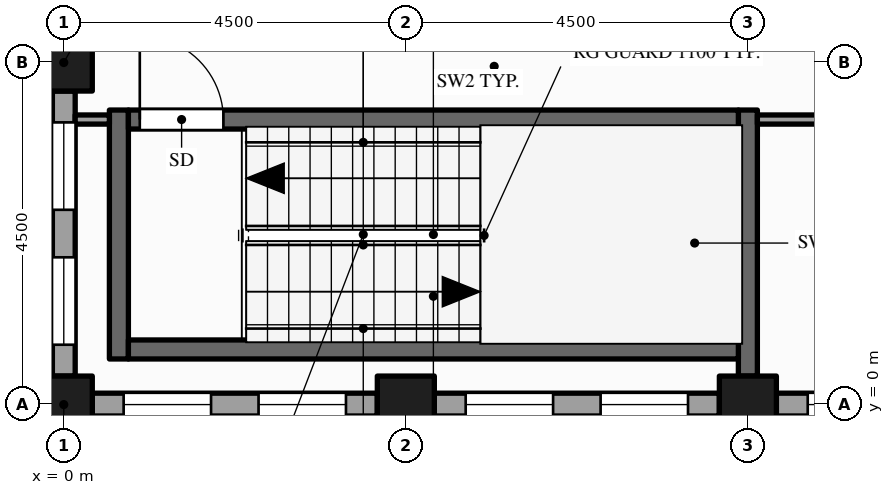
"""IFC4 building model, lengths in metres.
Left out: names, types, materials, properties, quantities, classifications, styles, units other than length and angle.
Written with IfcOpenShell. Run it as: python <this file> out.ifc"""

import sys

from ifc_helpers import new_model, si_unit, direction, frame, frame_2d, origin, origin_2d, place, context, subcontext, project, spatial, rectangle, hollow_rectangle, extrude, element, fill, save


model = new_model("IFC4")
c1 = context("Model", 3, precision=1e-05, world=origin(), true_north=direction((0.0, 1.0)))
c2 = subcontext(c1, "Body", "Model", "MODEL_VIEW")
j1 = project(units=[si_unit("LENGTHUNIT", "METRE"), si_unit("PLANEANGLEUNIT", "RADIAN")], contexts=[c1])
p1 = place(None, origin())
s1 = spatial("IfcSite", under=j1, at=p1, CompositionType="ELEMENT")
p2 = place(p1, origin())
s2 = spatial("IfcBuilding", under=s1, at=p2, CompositionType="ELEMENT")
p3 = place(p2, frame((0.0, 0.0, 227.0)))
s3 = spatial("IfcBuildingStorey", under=s2, at=p3, CompositionType="ELEMENT", Elevation=227.0)
for number, where, z_axis, x_axis in (
    (1, (0.0, 0.0, -0.15), (0.0, 0.0, 1.0), (1.0, 0.0, 0.0)),
    (2, (0.0, 4.5, -0.15), (0.0, 0.0, 1.0), (1.0, 0.0, 0.0)),
    (3, (4.5, 0.0, -0.15), (0.0, 0.0, 1.0), (1.0, 0.0, 0.0)),
    (4, (9.0, 0.0, -0.15), (0.0, 0.0, 1.0), (1.0, 0.0, 0.0)),
):
    element("IfcColumn", number, at=place(p3, frame(where, z_axis=z_axis, x_axis=x_axis)), inside=s3, PredefinedType="COLUMN", context=c2, shape_type="SweptSolid", body=[
        extrude(hollow_rectangle(XDim=0.75, YDim=0.75, WallThickness=0.036, at=origin_2d()), origin(), (0.0, 0.0, 1.0), 4.0),
    ])
p4 = place(p3, frame((0.0, 4.125, 0.0), z_axis=(0.0, 0.0, 1.0), x_axis=(0.0, -1.0, 0.0)))
e5 = element("IfcWall", 5, at=p4, inside=s3, PredefinedType="STANDARD", context=c2, shape_type="SweptSolid", body=[
    extrude(rectangle(XDim=3.75, YDim=0.3, at=frame_2d((1.875, 0.0))), origin(), (0.0, 0.0, 1.0), 3.157),
])
p5 = place(p4, frame((0.413, 0.0, 0.9)))
e6 = element("IfcOpeningElement", 6, at=p5, cuts=e5, PredefinedType="OPENING", context=c2, shape_type="SweptSolid", body=[
    extrude(rectangle(XDim=1.15, YDim=2.0, at=frame_2d((0.575, 1.0))), frame((0.0, 0.16, 0.0), z_axis=(0.0, -1.0, 0.0), x_axis=(1.0, 0.0, 0.0)), (0.0, 0.0, 1.0), 0.32),
])
p6 = place(p4, frame((2.188, 0.0, 0.9)))
e7 = element("IfcOpeningElement", 7, at=p6, cuts=e5, PredefinedType="OPENING", context=c2, shape_type="SweptSolid", body=[
    extrude(rectangle(XDim=1.15, YDim=2.0, at=frame_2d((0.575, 1.0))), frame((0.0, 0.16, 0.0), z_axis=(0.0, -1.0, 0.0), x_axis=(1.0, 0.0, 0.0)), (0.0, 0.0, 1.0), 0.32),
])
p7 = place(p3, frame((0.375, 0.0, 0.0), z_axis=(0.0, 0.0, 1.0), x_axis=(1.0, 0.0, 0.0)))
e8 = element("IfcWall", 8, at=p7, inside=s3, PredefinedType="STANDARD", context=c2, shape_type="SweptSolid", body=[
    extrude(rectangle(XDim=3.75, YDim=0.3, at=frame_2d((1.875, 0.0))), origin(), (0.0, 0.0, 1.0), 3.157),
])
p8 = place(p7, frame((0.413, 0.0, 0.9)))
e9 = element("IfcOpeningElement", 9, at=p8, cuts=e8, PredefinedType="OPENING", context=c2, shape_type="SweptSolid", body=[
    extrude(rectangle(XDim=1.15, YDim=2.0, at=frame_2d((0.575, 1.0))), frame((0.0, 0.16, 0.0), z_axis=(0.0, -1.0, 0.0), x_axis=(1.0, 0.0, 0.0)), (0.0, 0.0, 1.0), 0.32),
])
p9 = place(p7, frame((2.188, 0.0, 0.9)))
e10 = element("IfcOpeningElement", 10, at=p9, cuts=e8, PredefinedType="OPENING", context=c2, shape_type="SweptSolid", body=[
    extrude(rectangle(XDim=1.15, YDim=2.0, at=frame_2d((0.575, 1.0))), frame((0.0, 0.16, 0.0), z_axis=(0.0, -1.0, 0.0), x_axis=(1.0, 0.0, 0.0)), (0.0, 0.0, 1.0), 0.32),
])
p10 = place(p3, frame((4.875, 0.0, 0.0), z_axis=(0.0, 0.0, 1.0), x_axis=(1.0, 0.0, 0.0)))
e11 = element("IfcWall", 11, at=p10, inside=s3, PredefinedType="STANDARD", context=c2, shape_type="SweptSolid", body=[
    extrude(rectangle(XDim=3.75, YDim=0.3, at=frame_2d((1.875, 0.0))), origin(), (0.0, 0.0, 1.0), 3.157),
])
p11 = place(p10, frame((0.413, 0.0, 0.9)))
e12 = element("IfcOpeningElement", 12, at=p11, cuts=e11, PredefinedType="OPENING", context=c2, shape_type="SweptSolid", body=[
    extrude(rectangle(XDim=1.15, YDim=2.0, at=frame_2d((0.575, 1.0))), frame((0.0, 0.16, 0.0), z_axis=(0.0, -1.0, 0.0), x_axis=(1.0, 0.0, 0.0)), (0.0, 0.0, 1.0), 0.32),
])
p12 = place(p10, frame((2.188, 0.0, 0.9)))
e13 = element("IfcOpeningElement", 13, at=p12, cuts=e11, PredefinedType="OPENING", context=c2, shape_type="SweptSolid", body=[
    extrude(rectangle(XDim=1.15, YDim=2.0, at=frame_2d((0.575, 1.0))), frame((0.0, 0.16, 0.0), z_axis=(0.0, -1.0, 0.0), x_axis=(1.0, 0.0, 0.0)), (0.0, 0.0, 1.0), 0.32),
])
p13 = place(p3, frame((9.375, 0.0, 0.0), z_axis=(0.0, 0.0, 1.0), x_axis=(1.0, 0.0, 0.0)))
e14 = element("IfcWall", 14, at=p13, inside=s3, PredefinedType="STANDARD", context=c2, shape_type="SweptSolid", body=[
    extrude(rectangle(XDim=3.75, YDim=0.3, at=frame_2d((1.875, 0.0))), origin(), (0.0, 0.0, 1.0), 2.87),
])
p14 = place(p13, frame((0.413, 0.0, 0.9)))
e15 = element("IfcOpeningElement", 15, at=p14, cuts=e14, PredefinedType="OPENING", context=c2, shape_type="SweptSolid", body=[
    extrude(rectangle(XDim=1.15, YDim=1.75, at=frame_2d((0.575, 0.875))), frame((0.0, 0.16, 0.0), z_axis=(0.0, -1.0, 0.0), x_axis=(1.0, 0.0, 0.0)), (0.0, 0.0, 1.0), 0.32),
])
p15 = place(p13, frame((2.188, 0.0, 0.9)))
e16 = element("IfcOpeningElement", 16, at=p15, cuts=e14, PredefinedType="OPENING", context=c2, shape_type="SweptSolid", body=[
    extrude(rectangle(XDim=1.15, YDim=1.75, at=frame_2d((0.575, 0.875))), frame((0.0, 0.16, 0.0), z_axis=(0.0, -1.0, 0.0), x_axis=(1.0, 0.0, 0.0)), (0.0, 0.0, 1.0), 0.32),
])
p16 = place(p3, frame((0.725, 0.6, 0.0), z_axis=(0.0, 0.0, 1.0), x_axis=(0.0, 1.0, 0.0)))
e17 = element("IfcWall", 17, at=p16, inside=s3, PredefinedType="SHEAR", context=c2, shape_type="SweptSolid", body=[
    extrude(rectangle(XDim=3.275, YDim=0.25, at=frame_2d((1.637, 0.0))), origin(), (0.0, 0.0, 1.0), 3.85),
])
p17 = place(p3, frame((9.0, 0.375, 0.0), z_axis=(0.0, 0.0, 1.0), x_axis=(0.0, 1.0, 0.0)))
e18 = element("IfcWall", 18, at=p17, inside=s3, PredefinedType="SHEAR", context=c2, shape_type="SweptSolid", body=[
    extrude(rectangle(XDim=3.5, YDim=0.25, at=frame_2d((1.75, 0.0))), origin(), (0.0, 0.0, 1.0), 3.85),
])
p18 = place(p3, frame((0.85, 0.725, 0.0), z_axis=(0.0, 0.0, 1.0), x_axis=(1.0, 0.0, 0.0)))
e19 = element("IfcWall", 19, at=p18, inside=s3, PredefinedType="SHEAR", context=c2, shape_type="SweptSolid", body=[
    extrude(rectangle(XDim=8.025, YDim=0.25, at=frame_2d((4.012, 0.0))), origin(), (0.0, 0.0, 1.0), 3.85),
])
p19 = place(p3, frame((0.15, 3.75, 0.0), z_axis=(0.0, 0.0, 1.0), x_axis=(1.0, 0.0, 0.0)))
e20 = element("IfcWall", 20, at=p19, inside=s3, PredefinedType="PARTITIONING", context=c2, shape_type="SweptSolid", body=[
    extrude(rectangle(XDim=0.45, YDim=0.12, at=frame_2d((0.225, 0.0))), origin(), (0.0, 0.0, 1.0), 3.85),
])
p20 = place(p3, frame((0.85, 3.75, 0.0), z_axis=(0.0, 0.0, 1.0), x_axis=(1.0, 0.0, 0.0)))
e21 = element("IfcWall", 21, at=p20, inside=s3, PredefinedType="SHEAR", context=c2, shape_type="SweptSolid", body=[
    extrude(rectangle(XDim=8.025, YDim=0.25, at=frame_2d((4.012, 0.0))), origin(), (0.0, 0.0, 1.0), 3.85),
])
p21 = place(p20, frame((0.15, 0.0, 0.0)))
e22 = element("IfcOpeningElement", 22, at=p21, cuts=e21, PredefinedType="OPENING", context=c2, shape_type="SweptSolid", body=[
    extrude(rectangle(XDim=1.1, YDim=2.1, at=frame_2d((0.55, 1.05))), frame((0.0, 0.135, 0.0), z_axis=(0.0, -1.0, 0.0), x_axis=(1.0, 0.0, 0.0)), (0.0, 0.0, 1.0), 0.27),
])
p22 = place(p3, frame((9.125, 3.75, 0.0), z_axis=(0.0, 0.0, 1.0), x_axis=(1.0, 0.0, 0.0)))
e23 = element("IfcWall", 23, at=p22, inside=s3, PredefinedType="PARTITIONING", context=c2, shape_type="SweptSolid", body=[
    extrude(rectangle(XDim=4.315, YDim=0.12, at=frame_2d((2.157, 0.0))), origin(), (0.0, 0.0, 1.0), 2.87),
])
p23 = place(p5, origin())
e24 = element("IfcWindow", 24, at=p23, inside=s3, PartitioningType="SINGLE_PANEL", PredefinedType="WINDOW", context=c2, shape_type="SweptSolid", body=[
    extrude(rectangle(XDim=1.15, YDim=2.0, at=frame_2d((0.575, 1.0))), frame((0.0, 0.03, 0.0), z_axis=(0.0, -1.0, 0.0), x_axis=(1.0, 0.0, 0.0)), (0.0, 0.0, 1.0), 0.06),
])
fill(e6, e24)
p24 = place(p6, origin())
e25 = element("IfcWindow", 25, at=p24, inside=s3, PartitioningType="SINGLE_PANEL", PredefinedType="WINDOW", context=c2, shape_type="SweptSolid", body=[
    extrude(rectangle(XDim=1.15, YDim=2.0, at=frame_2d((0.575, 1.0))), frame((0.0, 0.03, 0.0), z_axis=(0.0, -1.0, 0.0), x_axis=(1.0, 0.0, 0.0)), (0.0, 0.0, 1.0), 0.06),
])
fill(e7, e25)
p25 = place(p8, origin())
e26 = element("IfcWindow", 26, at=p25, inside=s3, PartitioningType="SINGLE_PANEL", PredefinedType="WINDOW", context=c2, shape_type="SweptSolid", body=[
    extrude(rectangle(XDim=1.15, YDim=2.0, at=frame_2d((0.575, 1.0))), frame((0.0, 0.03, 0.0), z_axis=(0.0, -1.0, 0.0), x_axis=(1.0, 0.0, 0.0)), (0.0, 0.0, 1.0), 0.06),
])
fill(e9, e26)
p26 = place(p9, origin())
e27 = element("IfcWindow", 27, at=p26, inside=s3, PartitioningType="SINGLE_PANEL", PredefinedType="WINDOW", context=c2, shape_type="SweptSolid", body=[
    extrude(rectangle(XDim=1.15, YDim=2.0, at=frame_2d((0.575, 1.0))), frame((0.0, 0.03, 0.0), z_axis=(0.0, -1.0, 0.0), x_axis=(1.0, 0.0, 0.0)), (0.0, 0.0, 1.0), 0.06),
])
fill(e10, e27)
p27 = place(p11, origin())
e28 = element("IfcWindow", 28, at=p27, inside=s3, PartitioningType="SINGLE_PANEL", PredefinedType="WINDOW", context=c2, shape_type="SweptSolid", body=[
    extrude(rectangle(XDim=1.15, YDim=2.0, at=frame_2d((0.575, 1.0))), frame((0.0, 0.03, 0.0), z_axis=(0.0, -1.0, 0.0), x_axis=(1.0, 0.0, 0.0)), (0.0, 0.0, 1.0), 0.06),
])
fill(e12, e28)
p28 = place(p12, origin())
e29 = element("IfcWindow", 29, at=p28, inside=s3, PartitioningType="SINGLE_PANEL", PredefinedType="WINDOW", context=c2, shape_type="SweptSolid", body=[
    extrude(rectangle(XDim=1.15, YDim=2.0, at=frame_2d((0.575, 1.0))), frame((0.0, 0.03, 0.0), z_axis=(0.0, -1.0, 0.0), x_axis=(1.0, 0.0, 0.0)), (0.0, 0.0, 1.0), 0.06),
])
fill(e13, e29)
p29 = place(p14, origin())
e30 = element("IfcWindow", 30, at=p29, inside=s3, PartitioningType="SINGLE_PANEL", PredefinedType="WINDOW", context=c2, shape_type="SweptSolid", body=[
    extrude(rectangle(XDim=1.15, YDim=1.75, at=frame_2d((0.575, 0.875))), frame((0.0, 0.03, 0.0), z_axis=(0.0, -1.0, 0.0), x_axis=(1.0, 0.0, 0.0)), (0.0, 0.0, 1.0), 0.06),
])
fill(e15, e30)
p30 = place(p21, origin())
e31 = element("IfcDoor", 31, at=p30, inside=s3, OperationType="SINGLE_SWING_LEFT", PredefinedType="DOOR", context=c2, shape_type="SweptSolid", body=[
    extrude(rectangle(XDim=1.1, YDim=2.1, at=frame_2d((0.55, 1.05))), frame((0.0, 0.025, 0.0), z_axis=(0.0, -1.0, 0.0), x_axis=(1.0, 0.0, 0.0)), (0.0, 0.0, 1.0), 0.05),
])
fill(e22, e31)
save(model, sys.argv[1])
